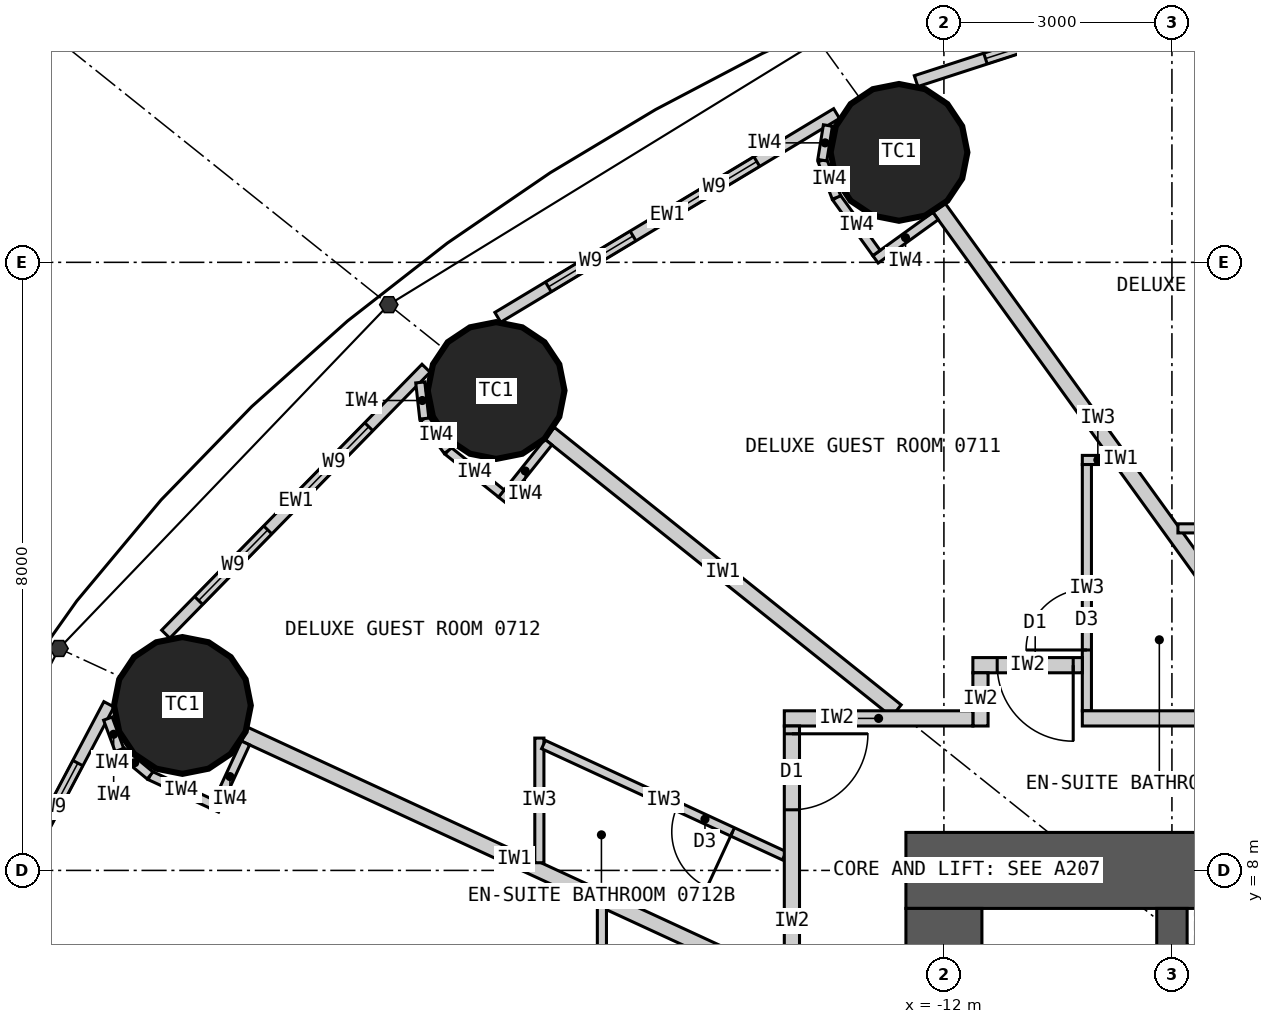
"""IFC4 building model, lengths in metres.
Left out: names, types, materials, properties, quantities, classifications, styles, units other than length and angle.
Written with IfcOpenShell. Run it as: python <this file> out.ifc"""

import sys

from ifc_helpers import new_model, si_unit, direction, frame, frame_2d, origin, origin_2d, place, context, subcontext, project, spatial, rectangle, circle, extrude, element, fill, save


model = new_model("IFC4")
c1 = context("Model", 3, precision=1e-05, world=origin(), true_north=direction((0.0, 1.0)))
c2 = subcontext(c1, "Body", "Model", "MODEL_VIEW")
j1 = project(units=[si_unit("LENGTHUNIT", "METRE"), si_unit("PLANEANGLEUNIT", "RADIAN")], contexts=[c1])
p1 = place(None, origin())
s1 = spatial("IfcSite", under=j1, at=p1, CompositionType="ELEMENT")
p2 = place(p1, origin())
s2 = spatial("IfcBuilding", under=s1, at=p2, CompositionType="ELEMENT")
p3 = place(p2, frame((0.0, 0.0, 36.0)))
s3 = spatial("IfcBuildingStorey", under=s2, at=p3, CompositionType="ELEMENT", Elevation=36.0)
for number, where, z_axis, x_axis in (
    (1, (-12.591, 17.447, 0.0), (0.0, 0.0, 1.0), (1.0, 0.0, 0.0)),
    (2, (-17.892, 14.313, 0.0), (0.0, 0.0, 1.0), (1.0, 0.0, 0.0)),
    (3, (-22.019, 10.17, 0.0), (0.0, 0.0, 1.0), (1.0, 0.0, 0.0)),
):
    element("IfcColumn", number, at=place(p3, frame(where, z_axis=z_axis, x_axis=x_axis)), inside=s3, PredefinedType="COLUMN", context=c2, shape_type="SweptSolid", body=[
        extrude(circle(Radius=0.9, at=origin_2d()), origin(), (0.0, 0.0, 1.0), 3.3),
    ])
p4 = place(p3, frame((-12.5, 8.0, 0.0), z_axis=(0.0, 0.0, 1.0), x_axis=(1.0, 0.0, 0.0)))
e4 = element("IfcWall", 4, at=p4, inside=s3, PredefinedType="SHEAR", context=c2, shape_type="SweptSolid", body=[
    extrude(rectangle(XDim=25.0, YDim=1.0, at=frame_2d((12.5, 0.0))), origin(), (0.0, 0.0, 1.0), 3.3),
])
p5 = place(p4, frame((11.2, 0.0, 0.0)))
e5 = element("IfcOpeningElement", 5, at=p5, cuts=e4, PredefinedType="OPENING", context=c2, shape_type="SweptSolid", body=[
    extrude(rectangle(XDim=1.2, YDim=2.2, at=frame_2d((0.6, 1.1))), frame((0.0, 0.51, 0.0), z_axis=(0.0, -1.0, 0.0), x_axis=(1.0, 0.0, 0.0)), (0.0, 0.0, 1.0), 1.02),
])
p6 = place(p4, frame((18.8, 0.0, 0.0)))
e6 = element("IfcOpeningElement", 6, at=p6, cuts=e4, PredefinedType="OPENING", context=c2, shape_type="SweptSolid", body=[
    extrude(rectangle(XDim=0.9, YDim=2.2, at=frame_2d((0.45, 1.1))), frame((0.0, 0.51, 0.0), z_axis=(0.0, -1.0, 0.0), x_axis=(1.0, 0.0, 0.0)), (0.0, 0.0, 1.0), 1.02),
])
p7 = place(p3, frame((-12.0, 7.5, 0.0), z_axis=(0.0, 0.0, 1.0), x_axis=(0.0, -1.0, 0.0)))
e7 = element("IfcWall", 7, at=p7, inside=s3, PredefinedType="SHEAR", context=c2, shape_type="SweptSolid", body=[
    extrude(rectangle(XDim=15.0, YDim=1.0, at=frame_2d((7.5, 0.0))), origin(), (0.0, 0.0, 1.0), 3.3),
])
p8 = place(p7, frame((6.6, 0.0, 0.0)))
e8 = element("IfcOpeningElement", 8, at=p8, cuts=e7, PredefinedType="OPENING", context=c2, shape_type="SweptSolid", body=[
    extrude(rectangle(XDim=1.8, YDim=2.2, at=frame_2d((0.9, 1.1))), frame((0.0, 0.51, 0.0), z_axis=(0.0, -1.0, 0.0), x_axis=(1.0, 0.0, 0.0)), (0.0, 0.0, 1.0), 1.02),
])
p9 = place(p3, frame((-9.0, 4.5, 0.0), z_axis=(0.0, 0.0, 1.0), x_axis=(0.0, 1.0, 0.0)))
e9 = element("IfcWall", 9, at=p9, inside=s3, PredefinedType="SHEAR", context=c2, shape_type="SweptSolid", body=[
    extrude(rectangle(XDim=3.0, YDim=0.4, at=frame_2d((1.5, 0.0))), origin(), (0.0, 0.0, 1.0), 3.3),
])
p10 = place(p3, frame((-7.188, 20.065, 0.0), z_axis=(0.0, 0.0, 1.0), x_axis=(-0.951138486029, -0.308764603532, 0.0)))
e10 = element("IfcWall", 10, at=p10, inside=s3, PredefinedType="ELEMENTEDWALL", context=c2, shape_type="SweptSolid", body=[
    extrude(rectangle(XDim=5.444, YDim=0.15, at=frame_2d((2.722, 0.0))), origin(), (0.0, 0.0, 1.0), 3.12),
])
p11 = place(p10, frame((1.284, 0.0, 0.9)))
e11 = element("IfcOpeningElement", 11, at=p11, cuts=e10, PredefinedType="OPENING", context=c2, shape_type="SweptSolid", body=[
    extrude(rectangle(XDim=1.3, YDim=1.9, at=frame_2d((0.65, 0.95))), frame((0.0, 0.085, 0.0), z_axis=(0.0, -1.0, 0.0), x_axis=(1.0, 0.0, 0.0)), (0.0, 0.0, 1.0), 0.17),
])
p12 = place(p10, frame((3.184, 0.0, 0.9)))
e12 = element("IfcOpeningElement", 12, at=p12, cuts=e10, PredefinedType="OPENING", context=c2, shape_type="SweptSolid", body=[
    extrude(rectangle(XDim=1.3, YDim=1.9, at=frame_2d((0.65, 0.95))), frame((0.0, 0.085, 0.0), z_axis=(0.0, -1.0, 0.0), x_axis=(1.0, 0.0, 0.0)), (0.0, 0.0, 1.0), 0.17),
])
p13 = place(p3, frame((-13.412, 17.957, 0.0), z_axis=(0.0, 0.0, 1.0), x_axis=(-0.856958191554, -0.515385931054, 0.0)))
e13 = element("IfcWall", 13, at=p13, inside=s3, PredefinedType="ELEMENTEDWALL", context=c2, shape_type="SweptSolid", body=[
    extrude(rectangle(XDim=5.201, YDim=0.15, at=frame_2d((2.601, 0.0))), origin(), (0.0, 0.0, 1.0), 3.12),
])
p14 = place(p13, frame((1.225, 0.0, 0.9)))
e14 = element("IfcOpeningElement", 14, at=p14, cuts=e13, PredefinedType="OPENING", context=c2, shape_type="SweptSolid", body=[
    extrude(rectangle(XDim=1.3, YDim=1.9, at=frame_2d((0.65, 0.95))), frame((0.0, 0.085, 0.0), z_axis=(0.0, -1.0, 0.0), x_axis=(1.0, 0.0, 0.0)), (0.0, 0.0, 1.0), 0.17),
])
p15 = place(p13, frame((3.125, 0.0, 0.9)))
e15 = element("IfcOpeningElement", 15, at=p15, cuts=e13, PredefinedType="OPENING", context=c2, shape_type="SweptSolid", body=[
    extrude(rectangle(XDim=1.3, YDim=1.9, at=frame_2d((0.65, 0.95))), frame((0.0, 0.085, 0.0), z_axis=(0.0, -1.0, 0.0), x_axis=(1.0, 0.0, 0.0)), (0.0, 0.0, 1.0), 0.17),
])
p16 = place(p3, frame((-18.813, 14.607, 0.0), z_axis=(0.0, 0.0, 1.0), x_axis=(-0.699612594083, -0.714522370679, 0.0)))
e16 = element("IfcWall", 16, at=p16, inside=s3, PredefinedType="ELEMENTEDWALL", context=c2, shape_type="SweptSolid", body=[
    extrude(rectangle(XDim=4.896, YDim=0.15, at=frame_2d((2.448, 0.0))), origin(), (0.0, 0.0, 1.0), 3.12),
])
p17 = place(p16, frame((1.077, 0.0, 0.9)))
e17 = element("IfcOpeningElement", 17, at=p17, cuts=e16, PredefinedType="OPENING", context=c2, shape_type="SweptSolid", body=[
    extrude(rectangle(XDim=1.3, YDim=1.9, at=frame_2d((0.65, 0.95))), frame((0.0, 0.085, 0.0), z_axis=(0.0, -1.0, 0.0), x_axis=(1.0, 0.0, 0.0)), (0.0, 0.0, 1.0), 0.17),
])
p18 = place(p16, frame((2.977, 0.0, 0.9)))
e18 = element("IfcOpeningElement", 18, at=p18, cuts=e16, PredefinedType="OPENING", context=c2, shape_type="SweptSolid", body=[
    extrude(rectangle(XDim=1.3, YDim=1.9, at=frame_2d((0.65, 0.95))), frame((0.0, 0.085, 0.0), z_axis=(0.0, -1.0, 0.0), x_axis=(1.0, 0.0, 0.0)), (0.0, 0.0, 1.0), 0.17),
])
p19 = place(p3, frame((-22.986, 10.185, 0.0), z_axis=(0.0, 0.0, 1.0), x_axis=(-0.467303182954, -0.884097129959, 0.0)))
e19 = element("IfcWall", 19, at=p19, inside=s3, PredefinedType="ELEMENTEDWALL", context=c2, shape_type="SweptSolid", body=[
    extrude(rectangle(XDim=4.606, YDim=0.15, at=frame_2d((2.303, 0.0))), origin(), (0.0, 0.0, 1.0), 3.12),
])
p20 = place(p19, frame((0.875, 0.0, 0.9)))
e20 = element("IfcOpeningElement", 20, at=p20, cuts=e19, PredefinedType="OPENING", context=c2, shape_type="SweptSolid", body=[
    extrude(rectangle(XDim=1.3, YDim=1.9, at=frame_2d((0.65, 0.95))), frame((0.0, 0.085, 0.0), z_axis=(0.0, -1.0, 0.0), x_axis=(1.0, 0.0, 0.0)), (0.0, 0.0, 1.0), 0.17),
])
p21 = place(p19, frame((2.775, 0.0, 0.9)))
e21 = element("IfcOpeningElement", 21, at=p21, cuts=e19, PredefinedType="OPENING", context=c2, shape_type="SweptSolid", body=[
    extrude(rectangle(XDim=1.3, YDim=1.9, at=frame_2d((0.65, 0.95))), frame((0.0, 0.085, 0.0), z_axis=(0.0, -1.0, 0.0), x_axis=(1.0, 0.0, 0.0)), (0.0, 0.0, 1.0), 0.17),
])
p22 = place(p3, frame((-7.289, 10.1, 0.0), z_axis=(0.0, 0.0, 1.0), x_axis=(-0.585216319319, 0.810877216108, 0.0)))
e22 = element("IfcWall", 22, at=p22, inside=s3, PredefinedType="PARTITIONING", context=c2, shape_type="SweptSolid", body=[
    extrude(rectangle(XDim=8.16, YDim=0.2, at=frame_2d((4.08, 0.0))), origin(), (0.0, 0.0, 1.0), 2.32),
])
p23 = place(p3, frame((-12.625, 10.1, 0.0), z_axis=(0.0, 0.0, 1.0), x_axis=(-0.780872884676, 0.624689953479, 0.0)))
e23 = element("IfcWall", 23, at=p23, inside=s3, PredefinedType="PARTITIONING", context=c2, shape_type="SweptSolid", body=[
    extrude(rectangle(XDim=5.845, YDim=0.2, at=frame_2d((2.922, 0.0))), origin(), (0.0, 0.0, 1.0), 2.32),
])
p24 = place(p3, frame((-14.1, 6.512, 0.0), z_axis=(0.0, 0.0, 1.0), x_axis=(-0.907842433118, 0.41931147925, 0.0)))
e24 = element("IfcWall", 24, at=p24, inside=s3, PredefinedType="PARTITIONING", context=c2, shape_type="SweptSolid", body=[
    extrude(rectangle(XDim=7.823, YDim=0.2, at=frame_2d((3.912, 0.0))), origin(), (0.0, 0.0, 1.0), 2.32),
])
p25 = place(p3, frame((-8.921, 12.5, 0.0), z_axis=(0.0, 0.0, 1.0), x_axis=(1.0, 0.0, 0.0)))
e25 = element("IfcWall", 25, at=p25, inside=s3, PredefinedType="PARTITIONING", context=c2, shape_type="SweptSolid", body=[
    extrude(rectangle(XDim=3.372, YDim=0.12, at=frame_2d((1.686, 0.0))), origin(), (0.0, 0.0, 1.0), 3.12),
])
p26 = place(p3, frame((-9.771, 13.4, 0.0), z_axis=(0.0, 0.0, 1.0), x_axis=(-1.0, 0.0, 0.0)))
e26 = element("IfcWall", 26, at=p26, inside=s3, PredefinedType="PARTITIONING", context=c2, shape_type="SweptSolid", body=[
    extrude(rectangle(XDim=0.408, YDim=0.12, at=frame_2d((0.204, 0.0))), origin(), (0.0, 0.0, 1.0), 3.12),
])
p27 = place(p3, frame((-10.119, 10.1, 0.0), z_axis=(0.0, 0.0, 1.0), x_axis=(0.0, 1.0, 0.0)))
e27 = element("IfcWall", 27, at=p27, inside=s3, PredefinedType="PARTITIONING", context=c2, shape_type="SweptSolid", body=[
    extrude(rectangle(XDim=3.24, YDim=0.12, at=frame_2d((1.62, 0.0))), origin(), (0.0, 0.0, 1.0), 3.12),
])
p28 = place(p27, frame((0.8, 0.0, 0.0)))
e28 = element("IfcOpeningElement", 28, at=p28, cuts=e27, PredefinedType="OPENING", context=c2, shape_type="SweptSolid", body=[
    extrude(rectangle(XDim=0.8, YDim=2.1, at=frame_2d((0.4, 1.05))), frame((0.0, 0.07, 0.0), z_axis=(0.0, -1.0, 0.0), x_axis=(1.0, 0.0, 0.0)), (0.0, 0.0, 1.0), 0.14),
])
p29 = place(p3, frame((-17.323, 8.101, 0.0), z_axis=(0.0, 0.0, 1.0), x_axis=(0.0, 1.0, 0.0)))
e29 = element("IfcWall", 29, at=p29, inside=s3, PredefinedType="PARTITIONING", context=c2, shape_type="SweptSolid", body=[
    extrude(rectangle(XDim=1.64, YDim=0.12, at=frame_2d((0.82, 0.0))), origin(), (0.0, 0.0, 1.0), 3.12),
])
p30 = place(p3, frame((-14.1, 8.193, 0.0), z_axis=(0.0, 0.0, 1.0), x_axis=(-0.907836493557, 0.419324338628, 0.0)))
e30 = element("IfcWall", 30, at=p30, inside=s3, PredefinedType="PARTITIONING", context=c2, shape_type="SweptSolid", body=[
    extrude(rectangle(XDim=3.49, YDim=0.12, at=frame_2d((1.745, 0.0))), origin(), (0.0, 0.0, 1.0), 3.12),
])
p31 = place(p30, frame((0.75, 0.0, 0.0)))
e31 = element("IfcOpeningElement", 31, at=p31, cuts=e30, PredefinedType="OPENING", context=c2, shape_type="SweptSolid", body=[
    extrude(rectangle(XDim=0.8, YDim=2.1, at=frame_2d((0.4, 1.05))), frame((0.0, 0.07, 0.0), z_axis=(0.0, -1.0, 0.0), x_axis=(1.0, 0.0, 0.0)), (0.0, 0.0, 1.0), 0.14),
])
p32 = place(p3, frame((-16.5, 7.521, 0.0), z_axis=(0.0, 0.0, 1.0), x_axis=(0.0, -1.0, 0.0)))
e32 = element("IfcWall", 32, at=p32, inside=s3, PredefinedType="PARTITIONING", context=c2, shape_type="SweptSolid", body=[
    extrude(rectangle(XDim=2.749, YDim=0.12, at=frame_2d((1.374, 0.0))), origin(), (0.0, 0.0, 1.0), 3.12),
])
p33 = place(p3, frame((-11.619, 10.7, 0.0), z_axis=(0.0, 0.0, 1.0), x_axis=(1.0, 0.0, 0.0)))
e33 = element("IfcWall", 33, at=p33, inside=s3, PredefinedType="PARTITIONING", context=c2, shape_type="SweptSolid", body=[
    extrude(rectangle(XDim=1.44, YDim=0.2, at=frame_2d((0.72, 0.0))), origin(), (0.0, 0.0, 1.0), 3.12),
])
p34 = place(p33, frame((0.32, 0.0, 0.0)))
e34 = element("IfcOpeningElement", 34, at=p34, cuts=e33, PredefinedType="OPENING", context=c2, shape_type="SweptSolid", body=[
    extrude(rectangle(XDim=1.0, YDim=2.2, at=frame_2d((0.5, 1.1))), frame((0.0, 0.11, 0.0), z_axis=(0.0, -1.0, 0.0), x_axis=(1.0, 0.0, 0.0)), (0.0, 0.0, 1.0), 0.22),
])
p35 = place(p3, frame((-11.519, 9.9, 0.0), z_axis=(0.0, 0.0, 1.0), x_axis=(0.0, 1.0, 0.0)))
e35 = element("IfcWall", 35, at=p35, inside=s3, PredefinedType="PARTITIONING", context=c2, shape_type="SweptSolid", body=[
    extrude(rectangle(XDim=0.7, YDim=0.2, at=frame_2d((0.35, 0.0))), origin(), (0.0, 0.0, 1.0), 3.12),
])
p36 = place(p3, frame((-14.1, 10.0, 0.0), z_axis=(0.0, 0.0, 1.0), x_axis=(1.0, 0.0, 0.0)))
e36 = element("IfcWall", 36, at=p36, inside=s3, PredefinedType="PARTITIONING", context=c2, shape_type="SweptSolid", body=[
    extrude(rectangle(XDim=2.481, YDim=0.2, at=frame_2d((1.24, 0.0))), origin(), (0.0, 0.0, 1.0), 3.12),
])
p37 = place(p3, frame((-10.179, 10.0, 0.0), z_axis=(0.0, 0.0, 1.0), x_axis=(1.0, 0.0, 0.0)))
e37 = element("IfcWall", 37, at=p37, inside=s3, PredefinedType="PARTITIONING", context=c2, shape_type="SweptSolid", body=[
    extrude(rectangle(XDim=4.63, YDim=0.2, at=frame_2d((2.315, 0.0))), origin(), (0.0, 0.0, 1.0), 3.12),
])
p38 = place(p3, frame((-14.0, 9.9, 0.0), z_axis=(0.0, 0.0, 1.0), x_axis=(0.0, -1.0, 0.0)))
e38 = element("IfcWall", 38, at=p38, inside=s3, PredefinedType="PARTITIONING", context=c2, shape_type="SweptSolid", body=[
    extrude(rectangle(XDim=5.127, YDim=0.2, at=frame_2d((2.564, 0.0))), origin(), (0.0, 0.0, 1.0), 3.12),
])
p39 = place(p38, frame((0.103, 0.0, 0.0)))
e39 = element("IfcOpeningElement", 39, at=p39, cuts=e38, PredefinedType="OPENING", context=c2, shape_type="SweptSolid", body=[
    extrude(rectangle(XDim=1.0, YDim=2.2, at=frame_2d((0.5, 1.1))), frame((0.0, 0.11, 0.0), z_axis=(0.0, -1.0, 0.0), x_axis=(1.0, 0.0, 0.0)), (0.0, 0.0, 1.0), 0.22),
])
p40 = place(p3, frame((-12.11, 16.609, 0.0), z_axis=(0.0, 0.0, 1.0), x_axis=(-0.810897160646, -0.585188683123, 0.0)))
e40 = element("IfcWall", 40, at=p40, inside=s3, PredefinedType="PARTITIONING", context=c2, shape_type="SweptSolid", body=[
    extrude(rectangle(XDim=0.975, YDim=0.12, at=frame_2d((0.487, 0.0))), origin(), (0.0, 0.0, 1.0), 3.12),
])
p41 = place(p3, frame((-12.887, 16.123, 0.0), z_axis=(0.0, 0.0, 1.0), x_axis=(-0.585054732094, 0.810993810367, 0.0)))
e41 = element("IfcWall", 41, at=p41, inside=s3, PredefinedType="PARTITIONING", context=c2, shape_type="SweptSolid", body=[
    extrude(rectangle(XDim=0.9, YDim=0.12, at=frame_2d((0.45, 0.0))), origin(), (0.0, 0.0, 1.0), 3.12),
])
p42 = place(p3, frame((-13.414, 16.853, 0.0), z_axis=(0.0, 0.0, 1.0), x_axis=(-0.355705277023, 0.934598178844, 0.0)))
e42 = element("IfcWall", 42, at=p42, inside=s3, PredefinedType="PARTITIONING", context=c2, shape_type="SweptSolid", body=[
    extrude(rectangle(XDim=0.525, YDim=0.12, at=frame_2d((0.263, 0.0))), origin(), (0.0, 0.0, 1.0), 3.12),
])
p43 = place(p3, frame((-13.6, 17.344, 0.0), z_axis=(0.0, 0.0, 1.0), x_axis=(0.15994604532, 0.987125758243, 0.0)))
e43 = element("IfcWall", 43, at=p43, inside=s3, PredefinedType="PARTITIONING", context=c2, shape_type="SweptSolid", body=[
    extrude(rectangle(XDim=0.462, YDim=0.12, at=frame_2d((0.231, 0.0))), origin(), (0.0, 0.0, 1.0), 3.12),
])
p44 = place(p3, frame((-17.205, 13.635, 0.0), z_axis=(0.0, 0.0, 1.0), x_axis=(-0.624756144097, -0.780819928289, 0.0)))
e44 = element("IfcWall", 44, at=p44, inside=s3, PredefinedType="PARTITIONING", context=c2, shape_type="SweptSolid", body=[
    extrude(rectangle(XDim=0.975, YDim=0.12, at=frame_2d((0.487, 0.0))), origin(), (0.0, 0.0, 1.0), 3.12),
])
p45 = place(p3, frame((-17.823, 12.959, 0.0), z_axis=(0.0, 0.0, 1.0), x_axis=(-0.780895271023, 0.624661969144, 0.0)))
e45 = element("IfcWall", 45, at=p45, inside=s3, PredefinedType="PARTITIONING", context=c2, shape_type="SweptSolid", body=[
    extrude(rectangle(XDim=0.9, YDim=0.12, at=frame_2d((0.45, 0.0))), origin(), (0.0, 0.0, 1.0), 3.12),
])
p46 = place(p3, frame((-18.526, 13.521, 0.0), z_axis=(0.0, 0.0, 1.0), x_axis=(-0.592532503205, 0.805546542818, 0.0)))
e46 = element("IfcWall", 46, at=p46, inside=s3, PredefinedType="PARTITIONING", context=c2, shape_type="SweptSolid", body=[
    extrude(rectangle(XDim=0.525, YDim=0.12, at=frame_2d((0.262, 0.0))), origin(), (0.0, 0.0, 1.0), 3.12),
])
p47 = place(p3, frame((-18.837, 13.944, 0.0), z_axis=(0.0, 0.0, 1.0), x_axis=(-0.110543348478, 0.993871303594, 0.0)))
e47 = element("IfcWall", 47, at=p47, inside=s3, PredefinedType="PARTITIONING", context=c2, shape_type="SweptSolid", body=[
    extrude(rectangle(XDim=0.479, YDim=0.12, at=frame_2d((0.24, 0.0))), origin(), (0.0, 0.0, 1.0), 3.12),
])
p48 = place(p3, frame((-21.189, 9.677, 0.0), z_axis=(0.0, 0.0, 1.0), x_axis=(-0.419344098106, -0.907827366509, 0.0)))
e48 = element("IfcWall", 48, at=p48, inside=s3, PredefinedType="PARTITIONING", context=c2, shape_type="SweptSolid", body=[
    extrude(rectangle(XDim=0.975, YDim=0.12, at=frame_2d((0.487, 0.0))), origin(), (0.0, 0.0, 1.0), 3.12),
])
p49 = place(p3, frame((-21.627, 8.872, 0.0), z_axis=(0.0, 0.0, 1.0), x_axis=(-0.907935564339, 0.419109783957, 0.0)))
e49 = element("IfcWall", 49, at=p49, inside=s3, PredefinedType="PARTITIONING", context=c2, shape_type="SweptSolid", body=[
    extrude(rectangle(XDim=0.9, YDim=0.12, at=frame_2d((0.45, 0.0))), origin(), (0.0, 0.0, 1.0), 3.12),
])
p50 = place(p3, frame((-22.445, 9.249, 0.0), z_axis=(0.0, 0.0, 1.0), x_axis=(-0.768335565584, 0.640047231584, 0.0)))
e50 = element("IfcWall", 50, at=p50, inside=s3, PredefinedType="PARTITIONING", context=c2, shape_type="SweptSolid", body=[
    extrude(rectangle(XDim=0.525, YDim=0.12, at=frame_2d((0.263, 0.0))), origin(), (0.0, 0.0, 1.0), 3.12),
])
p51 = place(p3, frame((-22.848, 9.585, 0.0), z_axis=(0.0, 0.0, 1.0), x_axis=(-0.345267312673, 0.938504386138, 0.0)))
e51 = element("IfcWall", 51, at=p51, inside=s3, PredefinedType="PARTITIONING", context=c2, shape_type="SweptSolid", body=[
    extrude(rectangle(XDim=0.439, YDim=0.12, at=frame_2d((0.22, 0.0))), origin(), (0.0, 0.0, 1.0), 3.12),
])
p52 = place(p12, origin())
e52 = element("IfcWindow", 52, at=p52, inside=s3, PartitioningType="SINGLE_PANEL", PredefinedType="WINDOW", context=c2, shape_type="SweptSolid", body=[
    extrude(rectangle(XDim=1.3, YDim=1.9, at=frame_2d((0.65, 0.95))), frame((0.0, 0.03, 0.0), z_axis=(0.0, -1.0, 0.0), x_axis=(1.0, 0.0, 0.0)), (0.0, 0.0, 1.0), 0.06),
])
fill(e12, e52)
p53 = place(p14, origin())
e53 = element("IfcWindow", 53, at=p53, inside=s3, PartitioningType="SINGLE_PANEL", PredefinedType="WINDOW", context=c2, shape_type="SweptSolid", body=[
    extrude(rectangle(XDim=1.3, YDim=1.9, at=frame_2d((0.65, 0.95))), frame((0.0, 0.03, 0.0), z_axis=(0.0, -1.0, 0.0), x_axis=(1.0, 0.0, 0.0)), (0.0, 0.0, 1.0), 0.06),
])
fill(e14, e53)
p54 = place(p15, origin())
e54 = element("IfcWindow", 54, at=p54, inside=s3, PartitioningType="SINGLE_PANEL", PredefinedType="WINDOW", context=c2, shape_type="SweptSolid", body=[
    extrude(rectangle(XDim=1.3, YDim=1.9, at=frame_2d((0.65, 0.95))), frame((0.0, 0.03, 0.0), z_axis=(0.0, -1.0, 0.0), x_axis=(1.0, 0.0, 0.0)), (0.0, 0.0, 1.0), 0.06),
])
fill(e15, e54)
p55 = place(p17, origin())
e55 = element("IfcWindow", 55, at=p55, inside=s3, PartitioningType="SINGLE_PANEL", PredefinedType="WINDOW", context=c2, shape_type="SweptSolid", body=[
    extrude(rectangle(XDim=1.3, YDim=1.9, at=frame_2d((0.65, 0.95))), frame((0.0, 0.03, 0.0), z_axis=(0.0, -1.0, 0.0), x_axis=(1.0, 0.0, 0.0)), (0.0, 0.0, 1.0), 0.06),
])
fill(e17, e55)
p56 = place(p18, origin())
e56 = element("IfcWindow", 56, at=p56, inside=s3, PartitioningType="SINGLE_PANEL", PredefinedType="WINDOW", context=c2, shape_type="SweptSolid", body=[
    extrude(rectangle(XDim=1.3, YDim=1.9, at=frame_2d((0.65, 0.95))), frame((0.0, 0.03, 0.0), z_axis=(0.0, -1.0, 0.0), x_axis=(1.0, 0.0, 0.0)), (0.0, 0.0, 1.0), 0.06),
])
fill(e18, e56)
p57 = place(p20, origin())
e57 = element("IfcWindow", 57, at=p57, inside=s3, PartitioningType="SINGLE_PANEL", PredefinedType="WINDOW", context=c2, shape_type="SweptSolid", body=[
    extrude(rectangle(XDim=1.3, YDim=1.9, at=frame_2d((0.65, 0.95))), frame((0.0, 0.03, 0.0), z_axis=(0.0, -1.0, 0.0), x_axis=(1.0, 0.0, 0.0)), (0.0, 0.0, 1.0), 0.06),
])
fill(e20, e57)
p58 = place(p28, origin())
e58 = element("IfcDoor", 58, at=p58, inside=s3, OperationType="SINGLE_SWING_LEFT", PredefinedType="DOOR", context=c2, shape_type="SweptSolid", body=[
    extrude(rectangle(XDim=0.8, YDim=2.1, at=frame_2d((0.4, 1.05))), frame((0.0, 0.025, 0.0), z_axis=(0.0, -1.0, 0.0), x_axis=(1.0, 0.0, 0.0)), (0.0, 0.0, 1.0), 0.05),
])
fill(e28, e58)
p59 = place(p34, origin())
e59 = element("IfcDoor", 59, at=p59, inside=s3, OperationType="SINGLE_SWING_RIGHT", PredefinedType="DOOR", context=c2, shape_type="SweptSolid", body=[
    extrude(rectangle(XDim=1.0, YDim=2.2, at=frame_2d((0.5, 1.1))), frame((0.0, 0.025, 0.0), z_axis=(0.0, -1.0, 0.0), x_axis=(1.0, 0.0, 0.0)), (0.0, 0.0, 1.0), 0.05),
])
fill(e34, e59)
p60 = place(p31, origin())
e60 = element("IfcDoor", 60, at=p60, inside=s3, OperationType="SINGLE_SWING_LEFT", PredefinedType="DOOR", context=c2, shape_type="SweptSolid", body=[
    extrude(rectangle(XDim=0.8, YDim=2.1, at=frame_2d((0.4, 1.05))), frame((0.0, 0.025, 0.0), z_axis=(0.0, -1.0, 0.0), x_axis=(1.0, 0.0, 0.0)), (0.0, 0.0, 1.0), 0.05),
])
fill(e31, e60)
p61 = place(p39, origin())
e61 = element("IfcDoor", 61, at=p61, inside=s3, OperationType="SINGLE_SWING_LEFT", PredefinedType="DOOR", context=c2, shape_type="SweptSolid", body=[
    extrude(rectangle(XDim=1.0, YDim=2.2, at=frame_2d((0.5, 1.1))), frame((0.0, 0.025, 0.0), z_axis=(0.0, -1.0, 0.0), x_axis=(1.0, 0.0, 0.0)), (0.0, 0.0, 1.0), 0.05),
])
fill(e39, e61)
save(model, sys.argv[1])
